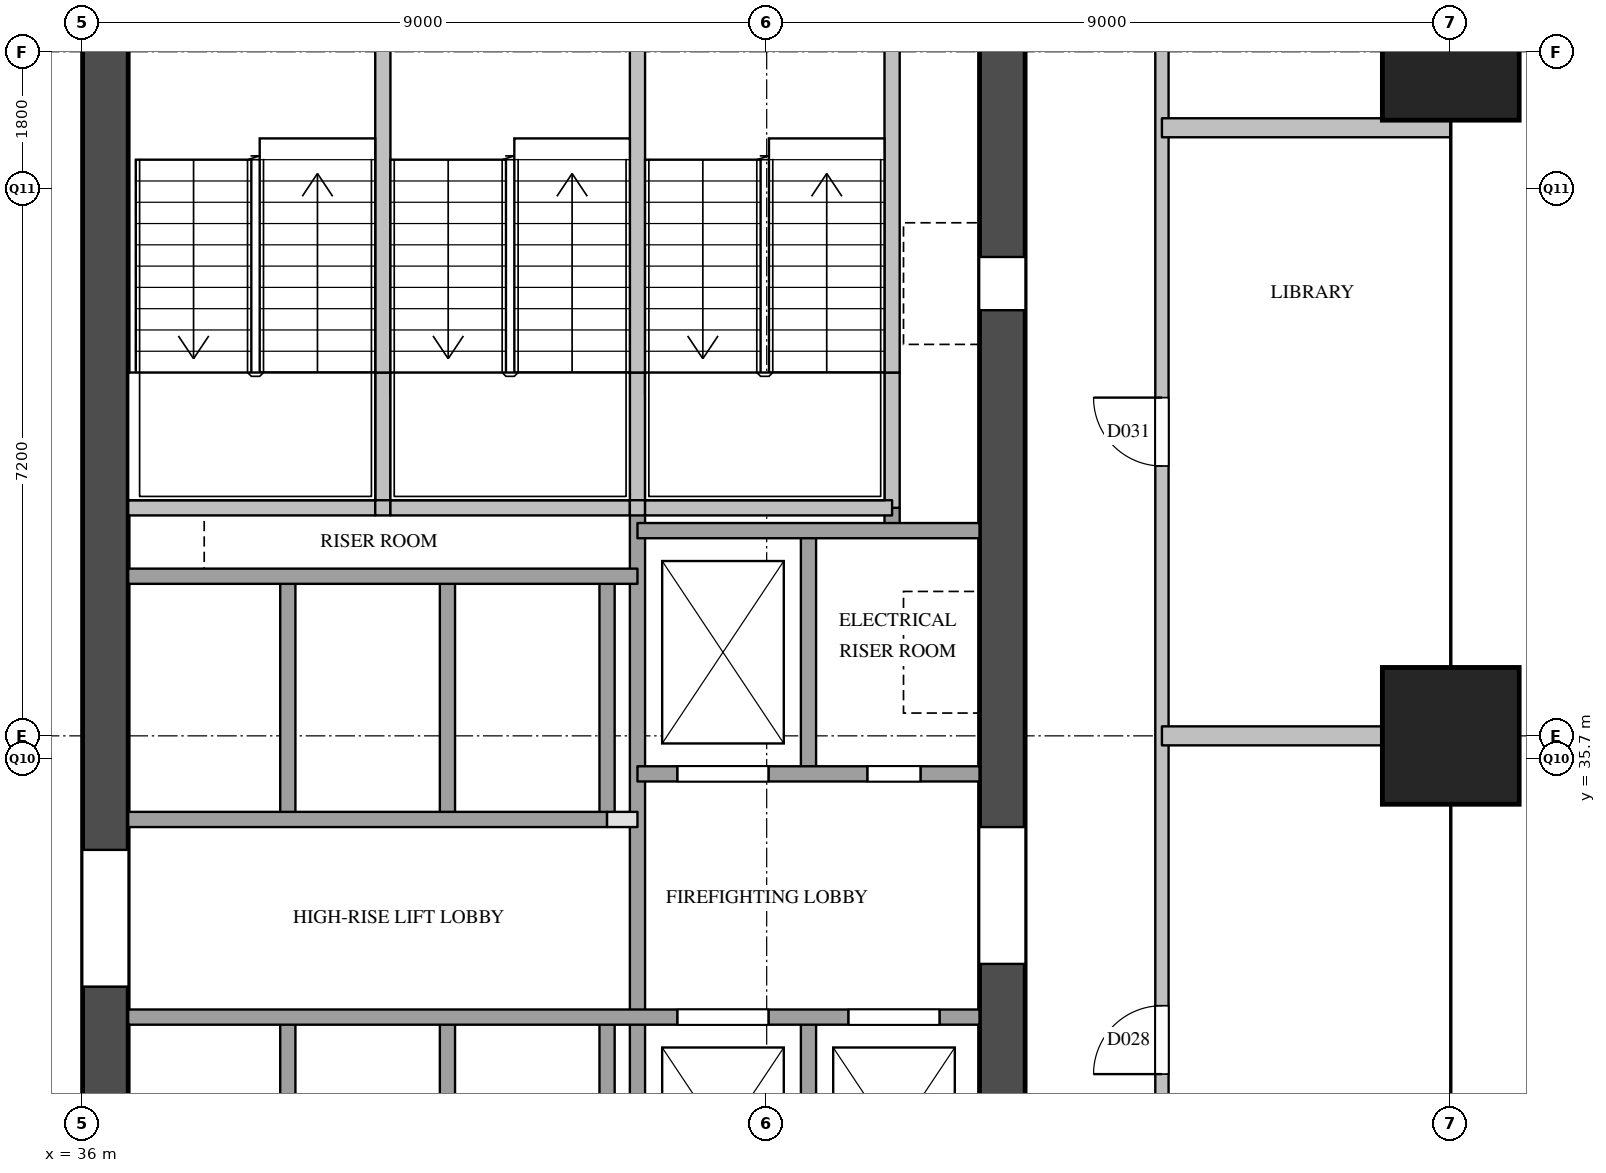
"""IFC4 building model, lengths in metres.
Left out: names, types, materials, properties, quantities, classifications, styles, units other than length and angle.
Written with IfcOpenShell. Run it as: python <this file> out.ifc"""

import sys

from ifc_helpers import new_model, si_unit, direction, frame, frame_2d, origin, origin_2d, place, context, subcontext, project, spatial, rectangle, extrude, element, fill, save


model = new_model("IFC4")
c1 = context("Model", 3, precision=1e-05, world=origin(), true_north=direction((0.0, 1.0)))
c2 = subcontext(c1, "Body", "Model", "MODEL_VIEW")
j1 = project(units=[si_unit("LENGTHUNIT", "METRE"), si_unit("PLANEANGLEUNIT", "RADIAN")], contexts=[c1])
p1 = place(None, origin())
s1 = spatial("IfcSite", under=j1, at=p1, CompositionType="ELEMENT")
p2 = place(p1, origin())
s2 = spatial("IfcBuilding", under=s1, at=p2, CompositionType="ELEMENT")
p3 = place(p2, frame((0.0, 0.0, 108.2)))
s3 = spatial("IfcBuildingStorey", under=s2, at=p3, CompositionType="ELEMENT", Elevation=108.2)
for number, where, z_axis, x_axis in (
    (1, (54.0, 36.0, 0.0), (0.0, 0.0, 1.0), (1.0, 0.0, 0.0)),
    (2, (54.0, 45.0, 0.0), (0.0, 0.0, 1.0), (1.0, 0.0, 0.0)),
):
    element("IfcColumn", number, at=place(p3, frame(where, z_axis=z_axis, x_axis=x_axis)), inside=s3, PredefinedType="COLUMN", context=c2, shape_type="SweptSolid", body=[
        extrude(rectangle(XDim=1.8, YDim=1.8, at=origin_2d()), origin(), (0.0, 0.0, 1.0), 3.8),
    ])
p4 = place(p3, frame((36.3, 29.1, 0.0), z_axis=(0.0, 0.0, 1.0), x_axis=(0.0, 1.0, 0.0)))
e3 = element("IfcWall", 3, at=p4, inside=s3, PredefinedType="SHEAR", context=c2, shape_type="SweptSolid", body=[
    extrude(rectangle(XDim=20.3, YDim=0.6, at=frame_2d((10.15, 0.0))), origin(), (0.0, 0.0, 1.0), 3.5),
])
p5 = place(p4, frame((3.6, 0.0, 0.0)))
e4 = element("IfcOpeningElement", 4, at=p5, cuts=e3, PredefinedType="OPENING", context=c2, shape_type="SweptSolid", body=[
    extrude(rectangle(XDim=1.8, YDim=2.1, at=frame_2d((0.9, 1.05))), frame((0.0, 0.31, 0.0), z_axis=(0.0, -1.0, 0.0), x_axis=(1.0, 0.0, 0.0)), (0.0, 0.0, 1.0), 0.62),
])
p6 = place(p4, frame((16.4, 0.0, 0.0)))
e5 = element("IfcOpeningElement", 5, at=p6, cuts=e3, PredefinedType="OPENING", context=c2, shape_type="SweptSolid", body=[
    extrude(rectangle(XDim=1.0, YDim=2.1, at=frame_2d((0.5, 1.05))), frame((0.0, 0.31, 0.0), z_axis=(0.0, -1.0, 0.0), x_axis=(1.0, 0.0, 0.0)), (0.0, 0.0, 1.0), 0.62),
])
p7 = place(p3, frame((48.1, 29.1, 0.0), z_axis=(0.0, 0.0, 1.0), x_axis=(0.0, 1.0, 0.0)))
e6 = element("IfcWall", 6, at=p7, inside=s3, PredefinedType="SHEAR", context=c2, shape_type="SweptSolid", body=[
    extrude(rectangle(XDim=20.3, YDim=0.6, at=frame_2d((10.15, 0.0))), origin(), (0.0, 0.0, 1.0), 3.5),
])
p8 = place(p7, frame((12.5, 0.0, 0.0)))
e7 = element("IfcOpeningElement", 7, at=p8, cuts=e6, PredefinedType="OPENING", context=c2, shape_type="SweptSolid", body=[
    extrude(rectangle(XDim=0.7, YDim=2.1, at=frame_2d((0.35, 1.05))), frame((0.0, 0.31, 0.0), z_axis=(0.0, -1.0, 0.0), x_axis=(1.0, 0.0, 0.0)), (0.0, 0.0, 1.0), 0.62),
])
p9 = place(p7, frame((3.9, 0.0, 0.0)))
e8 = element("IfcOpeningElement", 8, at=p9, cuts=e6, PredefinedType="OPENING", context=c2, shape_type="SweptSolid", body=[
    extrude(rectangle(XDim=1.8, YDim=2.1, at=frame_2d((0.9, 1.05))), frame((0.0, 0.31, 0.0), z_axis=(0.0, -1.0, 0.0), x_axis=(1.0, 0.0, 0.0)), (0.0, 0.0, 1.0), 0.62),
])
p10 = place(p3, frame((38.7, 29.1, 0.0), z_axis=(0.0, 0.0, 1.0), x_axis=(0.0, 1.0, 0.0)))
e9 = element("IfcWall", 9, at=p10, inside=s3, PredefinedType="SOLIDWALL", context=c2, shape_type="SweptSolid", body=[
    extrude(rectangle(XDim=3.2, YDim=0.2, at=frame_2d((1.6, 0.0))), origin(), (0.0, 0.0, 1.0), 3.5),
])
p11 = place(p3, frame((38.7, 34.9, 0.0), z_axis=(0.0, 0.0, 1.0), x_axis=(0.0, 1.0, 0.0)))
e10 = element("IfcWall", 10, at=p11, inside=s3, PredefinedType="SOLIDWALL", context=c2, shape_type="SweptSolid", body=[
    extrude(rectangle(XDim=3.2, YDim=0.2, at=frame_2d((1.6, 0.0))), origin(), (0.0, 0.0, 1.0), 3.5),
])
p12 = place(p3, frame((39.95, 39.0, 0.0), z_axis=(0.0, 0.0, 1.0), x_axis=(0.0, 1.0, 0.0)))
e11 = element("IfcWall", 11, at=p12, inside=s3, PredefinedType="SOLIDWALL", context=c2, shape_type="SweptSolid", body=[
    extrude(rectangle(XDim=1.78, YDim=0.2, at=frame_2d((0.89, 0.0))), origin(), (0.0, 0.0, 1.0), 3.5),
])
p13 = place(p3, frame((39.95, 40.78, 0.0), z_axis=(0.0, 0.0, 1.0), x_axis=(0.0, 1.0, 0.0)))
e12 = element("IfcWall", 12, at=p13, inside=s3, PredefinedType="SOLIDWALL", context=c2, shape_type="SweptSolid", body=[
    extrude(rectangle(XDim=4.42, YDim=0.2, at=frame_2d((2.21, 0.0))), origin(), (0.0, 0.0, 1.0), 3.5),
])
p14 = place(p3, frame((40.8, 29.1, 0.0), z_axis=(0.0, 0.0, 1.0), x_axis=(0.0, 1.0, 0.0)))
e13 = element("IfcWall", 13, at=p14, inside=s3, PredefinedType="SOLIDWALL", context=c2, shape_type="SweptSolid", body=[
    extrude(rectangle(XDim=3.2, YDim=0.2, at=frame_2d((1.6, 0.0))), origin(), (0.0, 0.0, 1.0), 3.5),
])
p15 = place(p3, frame((40.8, 34.9, 0.0), z_axis=(0.0, 0.0, 1.0), x_axis=(0.0, 1.0, 0.0)))
e14 = element("IfcWall", 14, at=p15, inside=s3, PredefinedType="SOLIDWALL", context=c2, shape_type="SweptSolid", body=[
    extrude(rectangle(XDim=3.2, YDim=0.2, at=frame_2d((1.6, 0.0))), origin(), (0.0, 0.0, 1.0), 3.5),
])
p16 = place(p3, frame((42.9, 29.1, 0.0), z_axis=(0.0, 0.0, 1.0), x_axis=(0.0, 1.0, 0.0)))
e15 = element("IfcWall", 15, at=p16, inside=s3, PredefinedType="SOLIDWALL", context=c2, shape_type="SweptSolid", body=[
    extrude(rectangle(XDim=3.2, YDim=0.2, at=frame_2d((1.6, 0.0))), origin(), (0.0, 0.0, 1.0), 3.5),
])
p17 = place(p3, frame((42.9, 34.9, 0.0), z_axis=(0.0, 0.0, 1.0), x_axis=(0.0, 1.0, 0.0)))
e16 = element("IfcWall", 16, at=p17, inside=s3, PredefinedType="SOLIDWALL", context=c2, shape_type="SweptSolid", body=[
    extrude(rectangle(XDim=3.2, YDim=0.2, at=frame_2d((1.6, 0.0))), origin(), (0.0, 0.0, 1.0), 3.5),
])
p18 = place(p3, frame((43.3, 29.1, 0.0), z_axis=(0.0, 0.0, 1.0), x_axis=(0.0, 1.0, 0.0)))
e17 = element("IfcWall", 17, at=p18, inside=s3, PredefinedType="SOLIDWALL", context=c2, shape_type="SweptSolid", body=[
    extrude(rectangle(XDim=9.9, YDim=0.2, at=frame_2d((4.95, 0.0))), origin(), (0.0, 0.0, 1.0), 3.5),
])
p19 = place(p3, frame((43.3, 39.0, 0.0), z_axis=(0.0, 0.0, 1.0), x_axis=(0.0, 1.0, 0.0)))
e18 = element("IfcWall", 18, at=p19, inside=s3, PredefinedType="SOLIDWALL", context=c2, shape_type="SweptSolid", body=[
    extrude(rectangle(XDim=1.78, YDim=0.2, at=frame_2d((0.89, 0.0))), origin(), (0.0, 0.0, 1.0), 3.5),
])
p20 = place(p3, frame((43.3, 40.78, 0.0), z_axis=(0.0, 0.0, 1.0), x_axis=(0.0, 1.0, 0.0)))
e19 = element("IfcWall", 19, at=p20, inside=s3, PredefinedType="SOLIDWALL", context=c2, shape_type="SweptSolid", body=[
    extrude(rectangle(XDim=4.42, YDim=0.2, at=frame_2d((2.21, 0.0))), origin(), (0.0, 0.0, 1.0), 3.5),
])
for number, where, z_axis, x_axis in (
    (20, (45.55, 29.1, 0.0), (0.0, 0.0, 1.0), (0.0, 1.0, 0.0)),
    (21, (45.55, 35.5, 0.0), (0.0, 0.0, 1.0), (0.0, 1.0, 0.0)),
):
    element("IfcWall", number, at=place(p3, frame(where, z_axis=z_axis, x_axis=x_axis)), inside=s3, PredefinedType="SOLIDWALL", context=c2, shape_type="SweptSolid", body=[
        extrude(rectangle(XDim=3.2, YDim=0.2, at=frame_2d((1.6, 0.0))), origin(), (0.0, 0.0, 1.0), 3.5),
    ])
p21 = place(p3, frame((46.65, 38.7, 0.0), z_axis=(0.0, 0.0, 1.0), x_axis=(0.0, 1.0, 0.0)))
e22 = element("IfcWall", 22, at=p21, inside=s3, PredefinedType="SOLIDWALL", context=c2, shape_type="SweptSolid", body=[
    extrude(rectangle(XDim=0.3, YDim=0.2, at=frame_2d((0.15, 0.0))), origin(), (0.0, 0.0, 1.0), 3.5),
])
p22 = place(p3, frame((46.65, 39.0, 0.0), z_axis=(0.0, 0.0, 1.0), x_axis=(0.0, 1.0, 0.0)))
e23 = element("IfcWall", 23, at=p22, inside=s3, PredefinedType="SOLIDWALL", context=c2, shape_type="SweptSolid", body=[
    extrude(rectangle(XDim=1.78, YDim=0.2, at=frame_2d((0.89, 0.0))), origin(), (0.0, 0.0, 1.0), 3.5),
])
p23 = place(p3, frame((46.65, 40.78, 0.0), z_axis=(0.0, 0.0, 1.0), x_axis=(0.0, 1.0, 0.0)))
e24 = element("IfcWall", 24, at=p23, inside=s3, PredefinedType="SOLIDWALL", context=c2, shape_type="SweptSolid", body=[
    extrude(rectangle(XDim=4.42, YDim=0.2, at=frame_2d((2.21, 0.0))), origin(), (0.0, 0.0, 1.0), 3.5),
])
p24 = place(p3, frame((36.6, 32.3, 0.0), z_axis=(0.0, 0.0, 1.0), x_axis=(1.0, 0.0, 0.0)))
e25 = element("IfcWall", 25, at=p24, inside=s3, PredefinedType="SOLIDWALL", context=c2, shape_type="SweptSolid", body=[
    extrude(rectangle(XDim=11.2, YDim=0.2, at=frame_2d((5.6, 0.0))), origin(), (0.0, 0.0, 1.0), 3.5),
])
p25 = place(p24, frame((7.225, 0.0, 0.0)))
e26 = element("IfcOpeningElement", 26, at=p25, cuts=e25, PredefinedType="OPENING", context=c2, shape_type="SweptSolid", body=[
    extrude(rectangle(XDim=1.2, YDim=2.1, at=frame_2d((0.6, 1.05))), frame((0.0, 0.11, 0.0), z_axis=(0.0, -1.0, 0.0), x_axis=(1.0, 0.0, 0.0)), (0.0, 0.0, 1.0), 0.22),
])
p26 = place(p24, frame((9.475, 0.0, 0.0)))
e27 = element("IfcOpeningElement", 27, at=p26, cuts=e25, PredefinedType="OPENING", context=c2, shape_type="SweptSolid", body=[
    extrude(rectangle(XDim=1.2, YDim=2.1, at=frame_2d((0.6, 1.05))), frame((0.0, 0.11, 0.0), z_axis=(0.0, -1.0, 0.0), x_axis=(1.0, 0.0, 0.0)), (0.0, 0.0, 1.0), 0.22),
])
p27 = place(p3, frame((42.9, 34.9, 0.0), z_axis=(0.0, 0.0, 1.0), x_axis=(1.0, 0.0, 0.0)))
e28 = element("IfcWall", 28, at=p27, inside=s3, PredefinedType="PARTITIONING", context=c2, shape_type="SweptSolid", body=[
    extrude(rectangle(XDim=0.4, YDim=0.2, at=frame_2d((0.2, 0.0))), origin(), (0.0, 0.0, 1.0), 3.5),
])
p28 = place(p3, frame((36.6, 34.9, 0.0), z_axis=(0.0, 0.0, 1.0), x_axis=(1.0, 0.0, 0.0)))
e29 = element("IfcWall", 29, at=p28, inside=s3, PredefinedType="SOLIDWALL", context=c2, shape_type="SweptSolid", body=[
    extrude(rectangle(XDim=6.3, YDim=0.2, at=frame_2d((3.15, 0.0))), origin(), (0.0, 0.0, 1.0), 3.5),
])
p29 = place(p3, frame((43.3, 35.5, 0.0), z_axis=(0.0, 0.0, 1.0), x_axis=(1.0, 0.0, 0.0)))
e30 = element("IfcWall", 30, at=p29, inside=s3, PredefinedType="SOLIDWALL", context=c2, shape_type="SweptSolid", body=[
    extrude(rectangle(XDim=4.5, YDim=0.2, at=frame_2d((2.25, 0.0))), origin(), (0.0, 0.0, 1.0), 3.5),
])
p30 = place(p29, frame((0.525, 0.0, 0.0)))
e31 = element("IfcOpeningElement", 31, at=p30, cuts=e30, PredefinedType="OPENING", context=c2, shape_type="SweptSolid", body=[
    extrude(rectangle(XDim=1.2, YDim=2.1, at=frame_2d((0.6, 1.05))), frame((0.0, 0.11, 0.0), z_axis=(0.0, -1.0, 0.0), x_axis=(1.0, 0.0, 0.0)), (0.0, 0.0, 1.0), 0.22),
])
p31 = place(p29, frame((3.025, 0.0, 0.0)))
e32 = element("IfcOpeningElement", 32, at=p31, cuts=e30, PredefinedType="OPENING", context=c2, shape_type="SweptSolid", body=[
    extrude(rectangle(XDim=0.7, YDim=2.1, at=frame_2d((0.35, 1.05))), frame((0.0, 0.11, 0.0), z_axis=(0.0, -1.0, 0.0), x_axis=(1.0, 0.0, 0.0)), (0.0, 0.0, 1.0), 0.22),
])
p32 = place(p3, frame((36.6, 38.1, 0.0), z_axis=(0.0, 0.0, 1.0), x_axis=(1.0, 0.0, 0.0)))
e33 = element("IfcWall", 33, at=p32, inside=s3, PredefinedType="SOLIDWALL", context=c2, shape_type="SweptSolid", body=[
    extrude(rectangle(XDim=6.7, YDim=0.2, at=frame_2d((3.35, 0.0))), origin(), (0.0, 0.0, 1.0), 3.5),
])
p33 = place(p3, frame((43.3, 38.7, 0.0), z_axis=(0.0, 0.0, 1.0), x_axis=(1.0, 0.0, 0.0)))
e34 = element("IfcWall", 34, at=p33, inside=s3, PredefinedType="SOLIDWALL", context=c2, shape_type="SweptSolid", body=[
    extrude(rectangle(XDim=4.5, YDim=0.2, at=frame_2d((2.25, 0.0))), origin(), (0.0, 0.0, 1.0), 3.5),
])
p34 = place(p3, frame((36.6, 39.0, 0.0), z_axis=(0.0, 0.0, 1.0), x_axis=(1.0, 0.0, 0.0)))
e35 = element("IfcWall", 35, at=p34, inside=s3, PredefinedType="SOLIDWALL", context=c2, shape_type="SweptSolid", body=[
    extrude(rectangle(XDim=3.25, YDim=0.2, at=frame_2d((1.625, 0.0))), origin(), (0.0, 0.0, 1.0), 3.5),
])
p35 = place(p3, frame((39.85, 39.0, 0.0), z_axis=(0.0, 0.0, 1.0), x_axis=(1.0, 0.0, 0.0)))
e36 = element("IfcWall", 36, at=p35, inside=s3, PredefinedType="SOLIDWALL", context=c2, shape_type="SweptSolid", body=[
    extrude(rectangle(XDim=0.2, YDim=0.2, at=frame_2d((0.1, 0.0))), origin(), (0.0, 0.0, 1.0), 3.5),
])
p36 = place(p3, frame((40.05, 39.0, 0.0), z_axis=(0.0, 0.0, 1.0), x_axis=(1.0, 0.0, 0.0)))
e37 = element("IfcWall", 37, at=p36, inside=s3, PredefinedType="SOLIDWALL", context=c2, shape_type="SweptSolid", body=[
    extrude(rectangle(XDim=3.15, YDim=0.2, at=frame_2d((1.575, 0.0))), origin(), (0.0, 0.0, 1.0), 3.5),
])
p37 = place(p3, frame((43.2, 39.0, 0.0), z_axis=(0.0, 0.0, 1.0), x_axis=(1.0, 0.0, 0.0)))
e38 = element("IfcWall", 38, at=p37, inside=s3, PredefinedType="SOLIDWALL", context=c2, shape_type="SweptSolid", body=[
    extrude(rectangle(XDim=0.2, YDim=0.2, at=frame_2d((0.1, 0.0))), origin(), (0.0, 0.0, 1.0), 3.5),
])
p38 = place(p3, frame((43.4, 39.0, 0.0), z_axis=(0.0, 0.0, 1.0), x_axis=(1.0, 0.0, 0.0)))
e39 = element("IfcWall", 39, at=p38, inside=s3, PredefinedType="SOLIDWALL", context=c2, shape_type="SweptSolid", body=[
    extrude(rectangle(XDim=3.25, YDim=0.2, at=frame_2d((1.625, 0.0))), origin(), (0.0, 0.0, 1.0), 3.5),
])
p39 = place(p3, frame((50.2, 26.7, 0.0), z_axis=(0.0, 0.0, 1.0), x_axis=(0.0, 1.0, 0.0)))
e40 = element("IfcWall", 40, at=p39, inside=s3, PredefinedType="PARTITIONING", context=c2, shape_type="SweptSolid", body=[
    extrude(rectangle(XDim=25.1, YDim=0.175, at=frame_2d((12.55, 0.0))), origin(), (0.0, 0.0, 1.0), 2.5),
])
p40 = place(p39, frame((4.85, 0.0, 0.0)))
e41 = element("IfcOpeningElement", 41, at=p40, cuts=e40, PredefinedType="OPENING", context=c2, shape_type="SweptSolid", body=[
    extrude(rectangle(XDim=0.9, YDim=2.1, at=frame_2d((0.45, 1.05))), frame((0.0, 0.097, 0.0), z_axis=(0.0, -1.0, 0.0), x_axis=(1.0, 0.0, 0.0)), (0.0, 0.0, 1.0), 0.195),
])
p41 = place(p39, frame((12.85, 0.0, 0.0)))
e42 = element("IfcOpeningElement", 42, at=p41, cuts=e40, PredefinedType="OPENING", context=c2, shape_type="SweptSolid", body=[
    extrude(rectangle(XDim=0.9, YDim=2.1, at=frame_2d((0.45, 1.05))), frame((0.0, 0.097, 0.0), z_axis=(0.0, -1.0, 0.0), x_axis=(1.0, 0.0, 0.0)), (0.0, 0.0, 1.0), 0.195),
])
p42 = place(p39, frame((20.75, 0.0, 0.0)))
e43 = element("IfcOpeningElement", 43, at=p42, cuts=e40, PredefinedType="OPENING", context=c2, shape_type="SweptSolid", body=[
    extrude(rectangle(XDim=0.9, YDim=2.1, at=frame_2d((0.45, 1.05))), frame((0.0, 0.097, 0.0), z_axis=(0.0, -1.0, 0.0), x_axis=(1.0, 0.0, 0.0)), (0.0, 0.0, 1.0), 0.195),
])
p43 = place(p3, frame((50.2, 36.0, 0.0), z_axis=(0.0, 0.0, 1.0), x_axis=(1.0, 0.0, 0.0)))
e44 = element("IfcWall", 44, at=p43, inside=s3, PredefinedType="PARTITIONING", context=c2, shape_type="SweptSolid", body=[
    extrude(rectangle(XDim=3.8, YDim=0.25, at=frame_2d((1.9, 0.0))), origin(), (0.0, 0.0, 1.0), 3.5),
])
p44 = place(p3, frame((50.2, 44.0, 0.0), z_axis=(0.0, 0.0, 1.0), x_axis=(1.0, 0.0, 0.0)))
e45 = element("IfcWall", 45, at=p44, inside=s3, PredefinedType="PARTITIONING", context=c2, shape_type="SweptSolid", body=[
    extrude(rectangle(XDim=3.8, YDim=0.25, at=frame_2d((1.9, 0.0))), origin(), (0.0, 0.0, 1.0), 2.5),
])
p45 = place(p25, origin())
e46 = element("IfcDoor", 46, at=p45, inside=s3, OperationType="SLIDING_TO_LEFT", PredefinedType="DOOR", context=c2, shape_type="SweptSolid", body=[
    extrude(rectangle(XDim=1.2, YDim=2.1, at=frame_2d((0.6, 1.05))), frame((0.0, 0.025, 0.0), z_axis=(0.0, -1.0, 0.0), x_axis=(1.0, 0.0, 0.0)), (0.0, 0.0, 1.0), 0.05),
])
fill(e26, e46)
p46 = place(p26, origin())
e47 = element("IfcDoor", 47, at=p46, inside=s3, OperationType="SLIDING_TO_LEFT", PredefinedType="DOOR", context=c2, shape_type="SweptSolid", body=[
    extrude(rectangle(XDim=1.2, YDim=2.1, at=frame_2d((0.6, 1.05))), frame((0.0, 0.025, 0.0), z_axis=(0.0, -1.0, 0.0), x_axis=(1.0, 0.0, 0.0)), (0.0, 0.0, 1.0), 0.05),
])
fill(e27, e47)
p47 = place(p30, origin())
e48 = element("IfcDoor", 48, at=p47, inside=s3, OperationType="SLIDING_TO_LEFT", PredefinedType="DOOR", context=c2, shape_type="SweptSolid", body=[
    extrude(rectangle(XDim=1.2, YDim=2.1, at=frame_2d((0.6, 1.05))), frame((0.0, 0.025, 0.0), z_axis=(0.0, -1.0, 0.0), x_axis=(1.0, 0.0, 0.0)), (0.0, 0.0, 1.0), 0.05),
])
fill(e31, e48)
p48 = place(p5, origin())
e49 = element("IfcDoor", 49, at=p48, inside=s3, OperationType="DOUBLE_DOOR_SINGLE_SWING", PredefinedType="DOOR", context=c2, shape_type="SweptSolid", body=[
    extrude(rectangle(XDim=1.8, YDim=2.1, at=frame_2d((0.9, 1.05))), frame((0.0, 0.025, 0.0), z_axis=(0.0, -1.0, 0.0), x_axis=(1.0, 0.0, 0.0)), (0.0, 0.0, 1.0), 0.05),
])
fill(e4, e49)
p49 = place(p8, origin())
e50 = element("IfcDoor", 50, at=p49, inside=s3, OperationType="SINGLE_SWING_RIGHT", PredefinedType="DOOR", context=c2, shape_type="SweptSolid", body=[
    extrude(rectangle(XDim=0.7, YDim=2.1, at=frame_2d((0.35, 1.05))), frame((0.0, 0.025, 0.0), z_axis=(0.0, -1.0, 0.0), x_axis=(1.0, 0.0, 0.0)), (0.0, 0.0, 1.0), 0.05),
])
fill(e7, e50)
p50 = place(p9, origin())
e51 = element("IfcDoor", 51, at=p50, inside=s3, OperationType="DOUBLE_DOOR_SINGLE_SWING", PredefinedType="DOOR", context=c2, shape_type="SweptSolid", body=[
    extrude(rectangle(XDim=1.8, YDim=2.1, at=frame_2d((0.9, 1.05))), frame((0.0, 0.025, 0.0), z_axis=(0.0, -1.0, 0.0), x_axis=(1.0, 0.0, 0.0)), (0.0, 0.0, 1.0), 0.05),
])
fill(e8, e51)
p51 = place(p31, origin())
e52 = element("IfcDoor", 52, at=p51, inside=s3, OperationType="SINGLE_SWING_RIGHT", PredefinedType="DOOR", context=c2, shape_type="SweptSolid", body=[
    extrude(rectangle(XDim=0.7, YDim=2.1, at=frame_2d((0.35, 1.05))), frame((0.0, 0.025, 0.0), z_axis=(0.0, -1.0, 0.0), x_axis=(1.0, 0.0, 0.0)), (0.0, 0.0, 1.0), 0.05),
])
fill(e32, e52)
p52 = place(p40, origin())
e53 = element("IfcDoor", 53, at=p52, inside=s3, OperationType="SINGLE_SWING_LEFT", PredefinedType="DOOR", context=c2, shape_type="SweptSolid", body=[
    extrude(rectangle(XDim=0.9, YDim=2.1, at=frame_2d((0.45, 1.05))), frame((0.0, 0.025, 0.0), z_axis=(0.0, -1.0, 0.0), x_axis=(1.0, 0.0, 0.0)), (0.0, 0.0, 1.0), 0.05),
])
fill(e41, e53)
p53 = place(p41, origin())
e54 = element("IfcDoor", 54, at=p53, inside=s3, OperationType="SINGLE_SWING_RIGHT", PredefinedType="DOOR", context=c2, shape_type="SweptSolid", body=[
    extrude(rectangle(XDim=0.9, YDim=2.1, at=frame_2d((0.45, 1.05))), frame((0.0, 0.025, 0.0), z_axis=(0.0, -1.0, 0.0), x_axis=(1.0, 0.0, 0.0)), (0.0, 0.0, 1.0), 0.05),
])
fill(e42, e54)
save(model, sys.argv[1])
